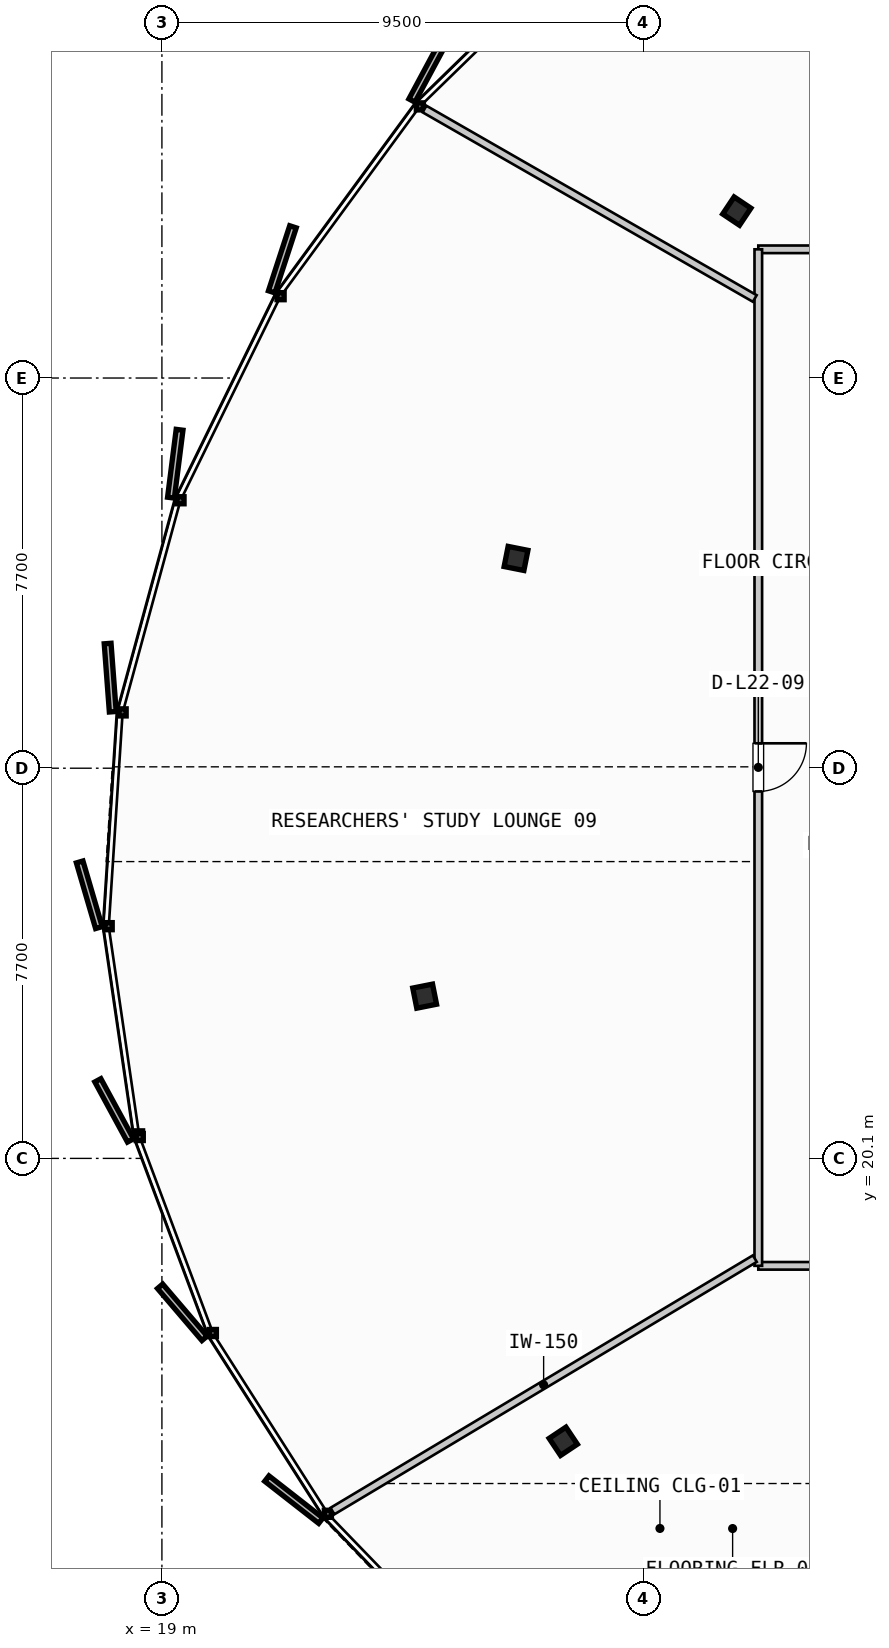
"""IFC4 building model, lengths in metres.
Left out: names, types, materials, properties, quantities, classifications, styles, units other than length and angle.
Written with IfcOpenShell. Run it as: python <this file> out.ifc"""

import sys

from ifc_helpers import new_model, si_unit, direction, frame, frame_2d, origin, origin_2d, place, context, subcontext, project, spatial, rectangle, i_section, extrude, source, transform, mapped, element, fill, save


model = new_model("IFC4")
c1 = context("Model", 3, precision=1e-05, world=origin(), true_north=direction((0.0, 1.0)))
c2 = subcontext(c1, "Body", "Model", "MODEL_VIEW")
j1 = project(units=[si_unit("LENGTHUNIT", "METRE"), si_unit("PLANEANGLEUNIT", "RADIAN")], contexts=[c1])
p1 = place(None, origin())
s1 = spatial("IfcSite", under=j1, at=p1, CompositionType="ELEMENT")
p2 = place(p1, origin())
s2 = spatial("IfcBuilding", under=s1, at=p2, CompositionType="ELEMENT")
p3 = place(p2, frame((0.0, 0.0, 92.8)))
s3 = spatial("IfcBuildingStorey", under=s2, at=p3, CompositionType="ELEMENT", Elevation=92.8)
m1 = source(origin(), c2, "Body", "SweptSolid", [
    extrude(i_section(OverallWidth=0.405, OverallDepth=0.398, WebThickness=0.035, FlangeThickness=0.056, FilletRadius=0.015, at=origin_2d()), origin(), (0.0, 0.0, 1.0), 3.35),
])
for number, where, z_axis, x_axis in (
    (1, (30.346, 38.794, 0.0), (0.0, 0.0, 1.0), (-0.831, 0.556, 0.0)),
    (2, (25.989, 31.94, 0.0), (0.0, 0.0, 1.0), (-0.981, 0.195, 0.0)),
    (3, (24.185, 23.302, 0.0), (0.0, 0.0, 1.0), (-0.981, -0.195, 0.0)),
    (4, (26.921, 14.517, 0.0), (0.0, 0.0, 1.0), (-0.831, -0.556, 0.0)),
):
    element("IfcColumn", number, at=place(p3, frame(where, z_axis=z_axis, x_axis=x_axis)), inside=s3, PredefinedType="COLUMN", context=c2, shape_type="MappedRepresentation", body=[
        mapped(m1, transform((0.0, 0.0, 0.0), scale=1.0)),
    ])
p4 = place(p3, frame((30.77, 17.98, 0.0), z_axis=(0.0, 0.0, 1.0), x_axis=(1.0, 0.0, 0.0)))
e5 = element("IfcWall", 5, at=p4, inside=s3, PredefinedType="PARTITIONING", context=c2, shape_type="SweptSolid", body=[
    extrude(rectangle(XDim=31.54, YDim=0.15, at=frame_2d((15.77, 0.0))), origin(), (0.0, 0.0, 1.0), 2.28),
])
p5 = place(p4, frame((4.848, 0.0, 0.0)))
e6 = element("IfcOpeningElement", 6, at=p5, cuts=e5, PredefinedType="OPENING", context=c2, shape_type="SweptSolid", body=[
    extrude(rectangle(XDim=0.95, YDim=2.15, at=frame_2d((0.475, 1.075))), frame((0.0, 0.085, 0.0), z_axis=(0.0, -1.0, 0.0), x_axis=(1.0, 0.0, 0.0)), (0.0, 0.0, 1.0), 0.17),
])
p6 = place(p4, frame((13.815, 0.0, 0.0)))
e7 = element("IfcOpeningElement", 7, at=p6, cuts=e5, PredefinedType="OPENING", context=c2, shape_type="SweptSolid", body=[
    extrude(rectangle(XDim=0.95, YDim=2.15, at=frame_2d((0.475, 1.075))), frame((0.0, 0.085, 0.0), z_axis=(0.0, -1.0, 0.0), x_axis=(1.0, 0.0, 0.0)), (0.0, 0.0, 1.0), 0.17),
])
p7 = place(p4, frame((24.281, 0.0, 0.0)))
e8 = element("IfcOpeningElement", 8, at=p7, cuts=e5, PredefinedType="OPENING", context=c2, shape_type="SweptSolid", body=[
    extrude(rectangle(XDim=0.95, YDim=2.15, at=frame_2d((0.475, 1.075))), frame((0.0, 0.085, 0.0), z_axis=(0.0, -1.0, 0.0), x_axis=(1.0, 0.0, 0.0)), (0.0, 0.0, 1.0), 0.17),
])
p8 = place(p3, frame((62.31, 38.04, 0.0), z_axis=(0.0, 0.0, 1.0), x_axis=(-1.0, 0.0, 0.0)))
e9 = element("IfcWall", 9, at=p8, inside=s3, PredefinedType="PARTITIONING", context=c2, shape_type="SweptSolid", body=[
    extrude(rectangle(XDim=31.54, YDim=0.15, at=frame_2d((15.77, 0.0))), origin(), (0.0, 0.0, 1.0), 2.28),
])
p9 = place(p8, frame((2.805, 0.0, 0.0)))
e10 = element("IfcOpeningElement", 10, at=p9, cuts=e9, PredefinedType="OPENING", context=c2, shape_type="SweptSolid", body=[
    extrude(rectangle(XDim=0.95, YDim=2.15, at=frame_2d((0.475, 1.075))), frame((0.0, 0.085, 0.0), z_axis=(0.0, -1.0, 0.0), x_axis=(1.0, 0.0, 0.0)), (0.0, 0.0, 1.0), 0.17),
])
p10 = place(p8, frame((11.538, 0.0, 0.0)))
e11 = element("IfcOpeningElement", 11, at=p10, cuts=e9, PredefinedType="OPENING", context=c2, shape_type="SweptSolid", body=[
    extrude(rectangle(XDim=0.95, YDim=2.15, at=frame_2d((0.475, 1.075))), frame((0.0, 0.085, 0.0), z_axis=(0.0, -1.0, 0.0), x_axis=(1.0, 0.0, 0.0)), (0.0, 0.0, 1.0), 0.17),
])
p11 = place(p8, frame((24.075, 0.0, 0.0)))
e12 = element("IfcOpeningElement", 12, at=p11, cuts=e9, PredefinedType="OPENING", context=c2, shape_type="SweptSolid", body=[
    extrude(rectangle(XDim=0.95, YDim=2.15, at=frame_2d((0.475, 1.075))), frame((0.0, 0.085, 0.0), z_axis=(0.0, -1.0, 0.0), x_axis=(1.0, 0.0, 0.0)), (0.0, 0.0, 1.0), 0.17),
])
p12 = place(p3, frame((30.77, 38.04, 0.0), z_axis=(0.0, 0.0, 1.0), x_axis=(0.0, -1.0, 0.0)))
e13 = element("IfcWall", 13, at=p12, inside=s3, PredefinedType="PARTITIONING", context=c2, shape_type="SweptSolid", body=[
    extrude(rectangle(XDim=20.06, YDim=0.15, at=frame_2d((10.03, 0.0))), origin(), (0.0, 0.0, 1.0), 2.28),
])
p13 = place(p12, frame((9.749, 0.0, 0.0)))
e14 = element("IfcOpeningElement", 14, at=p13, cuts=e13, PredefinedType="OPENING", context=c2, shape_type="SweptSolid", body=[
    extrude(rectangle(XDim=0.95, YDim=2.15, at=frame_2d((0.475, 1.075))), frame((0.0, 0.085, 0.0), z_axis=(0.0, -1.0, 0.0), x_axis=(1.0, 0.0, 0.0)), (0.0, 0.0, 1.0), 0.17),
])
p14 = place(p3, frame((30.701, 18.122, 0.0), z_axis=(0.0, 0.0, 1.0), x_axis=(-0.85839444225, -0.512990235301, 0.0)))
e15 = element("IfcWall", 15, at=p14, inside=s3, PredefinedType="PARTITIONING", context=c2, shape_type="SweptSolid", body=[
    extrude(rectangle(XDim=9.711, YDim=0.15, at=frame_2d((4.855, 0.0))), origin(), (0.0, 0.0, 1.0), 2.28),
])
p15 = place(p3, frame((30.701, 37.07, 0.0), z_axis=(0.0, 0.0, 1.0), x_axis=(-0.86743826156, 0.497544834545, 0.0)))
e16 = element("IfcWall", 16, at=p15, inside=s3, PredefinedType="PARTITIONING", context=c2, shape_type="SweptSolid", body=[
    extrude(rectangle(XDim=7.514, YDim=0.15, at=frame_2d((3.757, 0.0))), origin(), (0.0, 0.0, 1.0), 2.28),
])
m2 = source(origin(), c2, "Body", "SweptSolid", [
    extrude(rectangle(XDim=0.95, YDim=2.15, at=frame_2d((0.475, 1.075))), frame((0.0, 0.025, 0.0), z_axis=(0.0, -1.0, 0.0), x_axis=(1.0, 0.0, 0.0)), (0.0, 0.0, 1.0), 0.05),
])
p16 = place(p13, origin())
e17 = element("IfcDoor", 17, at=p16, inside=s3, OperationType="SINGLE_SWING_LEFT", PredefinedType="DOOR", context=c2, shape_type="MappedRepresentation", body=[
    mapped(m2, transform((0.0, 0.0, 0.0), scale=1.0)),
])
fill(e14, e17)
save(model, sys.argv[1])
